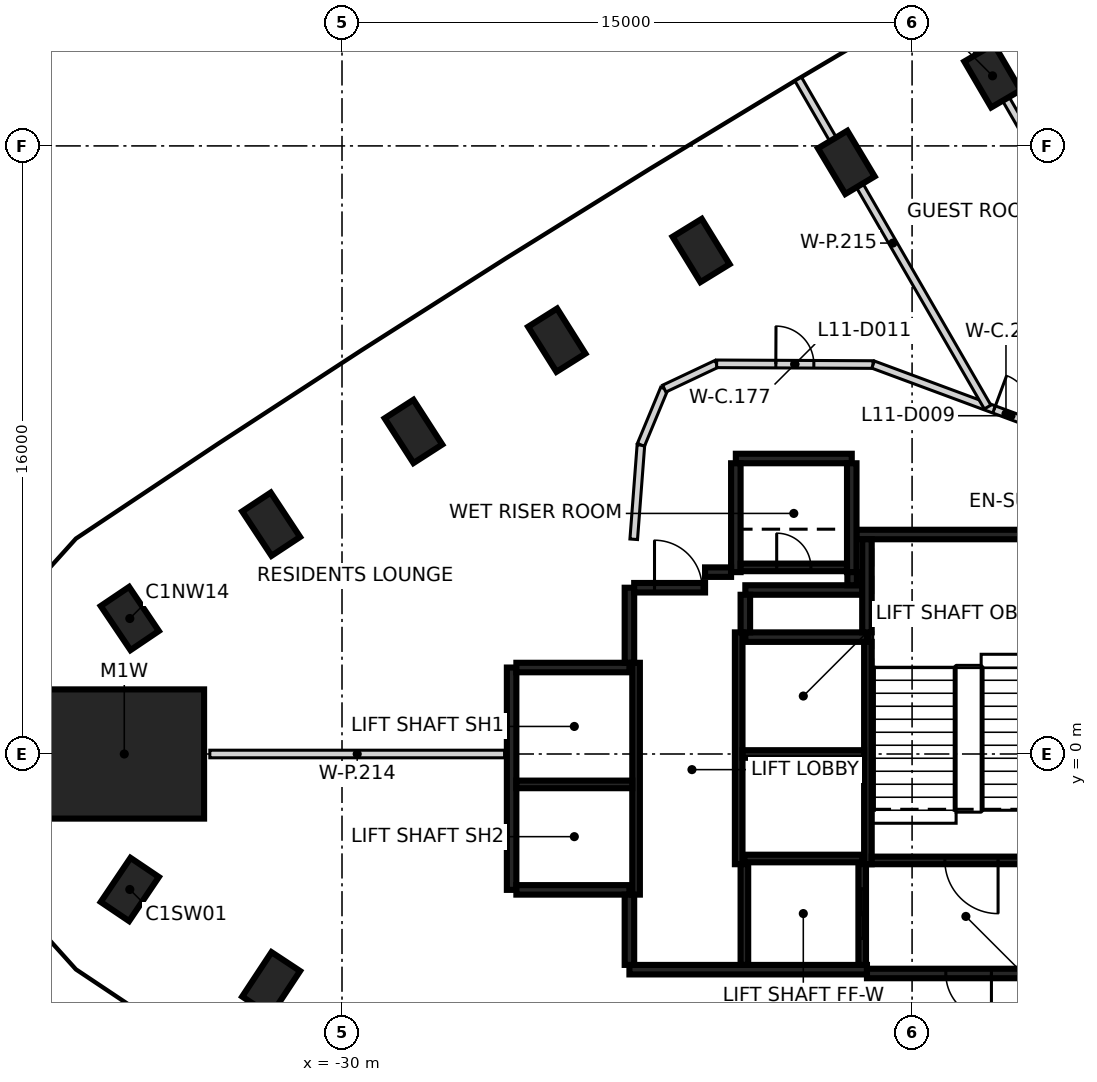
"""IFC4 building model, lengths in metres.
Left out: names, types, materials, properties, quantities, classifications, styles, units other than length and angle.
Written with IfcOpenShell. Run it as: python <this file> out.ifc"""

import sys

from ifc_helpers import new_model, si_unit, direction, frame, frame_2d, origin, origin_2d, place, context, subcontext, project, spatial, rectangle, extrude, element, fill, save


model = new_model("IFC4")
c1 = context("Model", 3, precision=1e-05, world=origin(), true_north=direction((0.0, 1.0)))
c2 = subcontext(c1, "Body", "Model", "MODEL_VIEW")
j1 = project(units=[si_unit("LENGTHUNIT", "METRE"), si_unit("PLANEANGLEUNIT", "RADIAN")], contexts=[c1])
p1 = place(None, origin())
s1 = spatial("IfcSite", under=j1, at=p1, CompositionType="ELEMENT")
p2 = place(p1, origin())
s2 = spatial("IfcBuilding", under=s1, at=p2, CompositionType="ELEMENT")
p3 = place(p2, frame((0.0, 0.0, 53.0)))
s3 = spatial("IfcBuildingStorey", under=s2, at=p3, CompositionType="ELEMENT", Elevation=53.0)
for number, where, z_axis, x_axis in (
    (1, (-12.883, 17.844, -0.475), (0.0, 0.0, 1.0), (-0.505, 0.863, 0.0)),
    (2, (-16.73, 15.566, -0.475), (0.0, 0.0, 1.0), (-0.514, 0.858, 0.0)),
    (3, (-20.552, 13.248, -0.475), (0.0, 0.0, 1.0), (-0.523, 0.852, 0.0)),
    (4, (-24.349, 10.888, -0.475), (0.0, 0.0, 1.0), (-0.532, 0.846, 0.0)),
    (5, (-28.12, 8.488, -0.475), (0.0, 0.0, 1.0), (-0.541, 0.841, 0.0)),
    (6, (-31.865, 6.046, -0.475), (0.0, 0.0, 1.0), (-0.551, 0.835, 0.0)),
    (7, (-35.583, 3.565, -0.475), (0.0, 0.0, 1.0), (-0.559, 0.829, 0.0)),
    (8, (-35.583, -3.565, -0.475), (0.0, 0.0, 1.0), (0.559, 0.829, 0.0)),
    (9, (-31.865, -6.046, -0.475), (0.0, 0.0, 1.0), (0.551, 0.835, 0.0)),
):
    element("IfcColumn", number, at=place(p3, frame(where, z_axis=z_axis, x_axis=x_axis)), inside=s3, PredefinedType="COLUMN", context=c2, shape_type="SweptSolid", body=[
        extrude(rectangle(XDim=1.4, YDim=0.9, at=origin_2d()), origin(), (0.0, 0.0, 1.0), 3.6),
    ])
p4 = place(p3, frame((-35.729, 0.0, -0.475), z_axis=(0.0, 0.0, 1.0), x_axis=(1.0, 0.0, 0.0)))
e10 = element("IfcColumn", 10, at=p4, inside=s3, PredefinedType="COLUMN", context=c2, shape_type="SweptSolid", body=[
    extrude(rectangle(XDim=4.2, YDim=3.4, at=origin_2d()), origin(), (0.0, 0.0, 1.0), 3.6),
])
p5 = place(p3, frame((-16.187, -5.675, 0.0), z_axis=(0.0, 0.0, 1.0), x_axis=(-1.0, 0.0, 0.0)))
e11 = element("IfcWall", 11, at=p5, inside=s3, PredefinedType="SHEAR", context=c2, shape_type="SweptSolid", body=[
    extrude(rectangle(XDim=6.25, YDim=0.25, at=frame_2d((3.125, 0.0))), origin(), (0.0, 0.0, 1.0), 3.125),
])
p6 = place(p3, frame((-25.537, -3.575, 0.0), z_axis=(0.0, 0.0, 1.0), x_axis=(0.0, 1.0, 0.0)))
e12 = element("IfcWall", 12, at=p6, inside=s3, PredefinedType="SHEAR", context=c2, shape_type="SweptSolid", body=[
    extrude(rectangle(XDim=5.85, YDim=0.25, at=frame_2d((2.925, 0.0))), origin(), (0.0, 0.0, 1.0), 3.125),
])
p7 = place(p3, frame((-10.963, -5.775, 0.0), z_axis=(0.0, 0.0, 1.0), x_axis=(-1.0, 0.0, 0.0)))
e13 = element("IfcWall", 13, at=p7, inside=s3, PredefinedType="SHEAR", context=c2, shape_type="SweptSolid", body=[
    extrude(rectangle(XDim=5.225, YDim=0.25, at=frame_2d((2.612, 0.0))), origin(), (0.0, 0.0, 1.0), 3.125),
])
p8 = place(p7, frame((1.95, 0.0, 0.0)))
e14 = element("IfcOpeningElement", 14, at=p8, cuts=e13, PredefinedType="OPENING", context=c2, shape_type="SweptSolid", body=[
    extrude(rectangle(XDim=1.2, YDim=2.1, at=frame_2d((0.6, 1.05))), frame((0.0, 0.135, 0.0), z_axis=(0.0, -1.0, 0.0), x_axis=(1.0, 0.0, 0.0)), (0.0, 0.0, 1.0), 0.27),
])
p9 = place(p3, frame((-16.472, 5.775, 0.0), z_axis=(0.0, 0.0, 1.0), x_axis=(1.0, 0.0, 0.0)))
e15 = element("IfcWall", 15, at=p9, inside=s3, PredefinedType="SHEAR", context=c2, shape_type="SweptSolid", body=[
    extrude(rectangle(XDim=5.51, YDim=0.25, at=frame_2d((2.755, 0.0))), origin(), (0.0, 0.0, 1.0), 3.125),
])
p10 = place(p3, frame((-19.387, 3.075, 0.0), z_axis=(0.0, 0.0, 1.0), x_axis=(1.0, 0.0, 0.0)))
e16 = element("IfcWall", 16, at=p10, inside=s3, PredefinedType="SHEAR", context=c2, shape_type="SweptSolid", body=[
    extrude(rectangle(XDim=3.2, YDim=0.25, at=frame_2d((1.6, 0.0))), origin(), (0.0, 0.0, 1.0), 3.125),
])
for number, where, z_axis, x_axis in (
    (17, (-22.437, -3.575, 0.0), (0.0, 0.0, 1.0), (-1.0, 0.0, 0.0)),
    (18, (-25.412, 2.275, 0.0), (0.0, 0.0, 1.0), (1.0, 0.0, 0.0)),
):
    element("IfcWall", number, at=place(p3, frame(where, z_axis=z_axis, x_axis=x_axis)), inside=s3, PredefinedType="SHEAR", context=c2, shape_type="SweptSolid", body=[
        extrude(rectangle(XDim=2.975, YDim=0.25, at=frame_2d((1.487, 0.0))), origin(), (0.0, 0.0, 1.0), 3.125),
    ])
p11 = place(p3, frame((-19.637, 7.775, 0.0), z_axis=(0.0, 0.0, 1.0), x_axis=(1.0, 0.0, 0.0)))
e19 = element("IfcWall", 19, at=p11, inside=s3, PredefinedType="SHEAR", context=c2, shape_type="SweptSolid", body=[
    extrude(rectangle(XDim=3.05, YDim=0.25, at=frame_2d((1.525, 0.0))), origin(), (0.0, 0.0, 1.0), 3.125),
])
for number, where, z_axis, x_axis in (
    (20, (-16.587, 7.65, 0.0), (0.0, 0.0, 1.0), (0.0, -1.0, 0.0)),
    (21, (-19.637, 4.785, 0.0), (0.0, 0.0, 1.0), (0.0, 1.0, 0.0)),
):
    element("IfcWall", number, at=place(p3, frame(where, z_axis=z_axis, x_axis=x_axis)), inside=s3, PredefinedType="SHEAR", context=c2, shape_type="SweptSolid", body=[
        extrude(rectangle(XDim=2.865, YDim=0.25, at=frame_2d((1.432, 0.0))), origin(), (0.0, 0.0, 1.0), 3.125),
    ])
p12 = place(p3, frame((-16.302, 4.315, 0.0), z_axis=(0.0, 0.0, 1.0), x_axis=(-1.0, 0.0, 0.0)))
e22 = element("IfcWall", 22, at=p12, inside=s3, PredefinedType="SHEAR", context=c2, shape_type="SweptSolid", body=[
    extrude(rectangle(XDim=3.085, YDim=0.25, at=frame_2d((1.542, 0.0))), origin(), (0.0, 0.0, 1.0), 3.125),
])
p13 = place(p3, frame((-16.187, 3.2, 0.0), z_axis=(0.0, 0.0, 1.0), x_axis=(0.0, 1.0, 0.0)))
e23 = element("IfcWall", 23, at=p13, inside=s3, PredefinedType="SHEAR", context=c2, shape_type="SweptSolid", body=[
    extrude(rectangle(XDim=2.449, YDim=0.25, at=frame_2d((1.225, 0.0))), origin(), (0.0, 0.0, 1.0), 3.125),
])
p14 = place(p3, frame((-22.437, 2.4, 0.0), z_axis=(0.0, 0.0, 1.0), x_axis=(0.0, 1.0, 0.0)))
e24 = element("IfcWall", 24, at=p14, inside=s3, PredefinedType="SHEAR", context=c2, shape_type="SweptSolid", body=[
    extrude(rectangle(XDim=1.975, YDim=0.25, at=frame_2d((0.987, 0.0))), origin(), (0.0, 0.0, 1.0), 3.125),
])
p15 = place(p3, frame((-22.437, -5.55, 0.0), z_axis=(0.0, 0.0, 1.0), x_axis=(0.0, 1.0, 0.0)))
e25 = element("IfcWall", 25, at=p15, inside=s3, PredefinedType="SHEAR", context=c2, shape_type="SweptSolid", body=[
    extrude(rectangle(XDim=1.849, YDim=0.25, at=frame_2d((0.925, 0.0))), origin(), (0.0, 0.0, 1.0), 3.125),
])
p16 = place(p3, frame((-22.312, 4.375, 0.0), z_axis=(0.0, 0.0, 1.0), x_axis=(1.0, 0.0, 0.0)))
e26 = element("IfcWall", 26, at=p16, inside=s3, PredefinedType="SHEAR", context=c2, shape_type="SweptSolid", body=[
    extrude(rectangle(XDim=1.865, YDim=0.25, at=frame_2d((0.932, 0.0))), origin(), (0.0, 0.0, 1.0), 3.125),
])
p17 = place(p16, frame((0.535, 0.0, 0.0)))
e27 = element("IfcOpeningElement", 27, at=p17, cuts=e26, PredefinedType="OPENING", context=c2, shape_type="SweptSolid", body=[
    extrude(rectangle(XDim=1.25, YDim=2.1, at=frame_2d((0.625, 1.05))), frame((0.0, 0.135, 0.0), z_axis=(0.0, -1.0, 0.0), x_axis=(1.0, 0.0, 0.0)), (0.0, 0.0, 1.0), 0.27),
])
p18 = place(p3, frame((-19.387, 4.19, 0.0), z_axis=(0.0, 0.0, 1.0), x_axis=(0.0, -1.0, 0.0)))
e28 = element("IfcWall", 28, at=p18, inside=s3, PredefinedType="SHEAR", context=c2, shape_type="SweptSolid", body=[
    extrude(rectangle(XDim=0.989, YDim=0.25, at=frame_2d((0.495, 0.0))), origin(), (0.0, 0.0, 1.0), 3.125),
])
p19 = place(p3, frame((-20.447, 4.785, 0.0), z_axis=(0.0, 0.0, 1.0), x_axis=(1.0, 0.0, 0.0)))
e29 = element("IfcWall", 29, at=p19, inside=s3, PredefinedType="SHEAR", context=c2, shape_type="SweptSolid", body=[
    extrude(rectangle(XDim=0.685, YDim=0.25, at=frame_2d((0.342, 0.0))), origin(), (0.0, 0.0, 1.0), 3.125),
])
p20 = place(p3, frame((-16.577, 4.785, 0.0), z_axis=(0.0, 0.0, 1.0), x_axis=(0.0, -1.0, 0.0)))
e30 = element("IfcWall", 30, at=p20, inside=s3, PredefinedType="SHEAR", context=c2, shape_type="SweptSolid", body=[
    extrude(rectangle(XDim=0.344, YDim=0.25, at=frame_2d((0.172, 0.0))), origin(), (0.0, 0.0, 1.0), 3.125),
])
p21 = place(p3, frame((-16.162, 2.951, 0.0), z_axis=(0.0, 0.0, 1.0), x_axis=(0.0, -1.0, 0.0)))
e31 = element("IfcWall", 31, at=p21, inside=s3, PredefinedType="SHEAR", context=c2, shape_type="SweptSolid", body=[
    extrude(rectangle(XDim=5.851, YDim=0.2, at=frame_2d((2.925, 0.0))), origin(), (0.0, 0.0, 1.0), 3.125),
])
for number, where, z_axis, x_axis in (
    (32, (-19.562, -2.9, 0.0), (0.0, 0.0, 1.0), (0.0, 1.0, 0.0)),
    (33, (-22.262, 2.4, 0.0), (0.0, 0.0, 1.0), (0.0, -1.0, 0.0)),
):
    element("IfcWall", number, at=place(p3, frame(where, z_axis=z_axis, x_axis=x_axis)), inside=s3, PredefinedType="SHEAR", context=c2, shape_type="SweptSolid", body=[
        extrude(rectangle(XDim=6.1, YDim=0.2, at=frame_2d((3.05, 0.0))), origin(), (0.0, 0.0, 1.0), 3.125),
    ])
p22 = place(p3, frame((-10.963, -2.8, 0.0), z_axis=(0.0, 0.0, 1.0), x_axis=(-1.0, 0.0, 0.0)))
e34 = element("IfcWall", 34, at=p22, inside=s3, PredefinedType="SHEAR", context=c2, shape_type="SweptSolid", body=[
    extrude(rectangle(XDim=5.098, YDim=0.2, at=frame_2d((2.549, 0.0))), origin(), (0.0, 0.0, 1.0), 3.125),
])
p23 = place(p22, frame((1.774, 0.0, 0.0)))
e35 = element("IfcOpeningElement", 35, at=p23, cuts=e34, PredefinedType="OPENING", context=c2, shape_type="SweptSolid", body=[
    extrude(rectangle(XDim=1.4, YDim=2.1, at=frame_2d((0.7, 1.05))), frame((0.0, 0.11, 0.0), z_axis=(0.0, -1.0, 0.0), x_axis=(1.0, 0.0, 0.0)), (0.0, 0.0, 1.0), 0.22),
])
p24 = place(p3, frame((-16.263, 0.0, 0.0), z_axis=(0.0, 0.0, 1.0), x_axis=(-1.0, 0.0, 0.0)))
e36 = element("IfcWall", 36, at=p24, inside=s3, PredefinedType="SHEAR", context=c2, shape_type="SweptSolid", body=[
    extrude(rectangle(XDim=3.198, YDim=0.2, at=frame_2d((1.599, 0.0))), origin(), (0.0, 0.0, 1.0), 3.125),
])
p25 = place(p3, frame((-22.363, -0.8, 0.0), z_axis=(0.0, 0.0, 1.0), x_axis=(-1.0, 0.0, 0.0)))
e37 = element("IfcWall", 37, at=p25, inside=s3, PredefinedType="SHEAR", context=c2, shape_type="SweptSolid", body=[
    extrude(rectangle(XDim=3.048, YDim=0.2, at=frame_2d((1.524, 0.0))), origin(), (0.0, 0.0, 1.0), 3.125),
])
p26 = place(p3, frame((-19.511, 4.91, 0.0), z_axis=(0.0, 0.0, 1.0), x_axis=(1.0, 0.0, 0.0)))
e38 = element("IfcWall", 38, at=p26, inside=s3, PredefinedType="SHEAR", context=c2, shape_type="SweptSolid", body=[
    extrude(rectangle(XDim=2.798, YDim=0.2, at=frame_2d((1.399, 0.0))), origin(), (0.0, 0.0, 1.0), 3.125),
])
p27 = place(p26, frame((0.949, 0.0, 0.0)))
e39 = element("IfcOpeningElement", 39, at=p27, cuts=e38, PredefinedType="OPENING", context=c2, shape_type="SweptSolid", body=[
    extrude(rectangle(XDim=0.9, YDim=2.1, at=frame_2d((0.45, 1.05))), frame((0.0, 0.11, 0.0), z_axis=(0.0, -1.0, 0.0), x_axis=(1.0, 0.0, 0.0)), (0.0, 0.0, 1.0), 0.22),
])
p28 = place(p3, frame((-19.412, -2.75, 0.0), z_axis=(0.0, 0.0, 1.0), x_axis=(1.0, 0.0, 0.0)))
e40 = element("IfcWall", 40, at=p28, inside=s3, PredefinedType="SHEAR", context=c2, shape_type="SweptSolid", body=[
    extrude(rectangle(XDim=3.1, YDim=0.2, at=frame_2d((1.55, 0.0))), origin(), (0.0, 0.0, 1.0), 3.125),
])
p29 = place(p3, frame((-16.312, -2.898, 0.0), z_axis=(0.0, 0.0, 1.0), x_axis=(0.0, -1.0, 0.0)))
e41 = element("IfcWall", 41, at=p29, inside=s3, PredefinedType="SHEAR", context=c2, shape_type="SweptSolid", body=[
    extrude(rectangle(XDim=2.651, YDim=0.2, at=frame_2d((1.325, 0.0))), origin(), (0.0, 0.0, 1.0), 3.125),
])
p30 = place(p29, frame((0.652, 0.0, 0.0)))
e42 = element("IfcOpeningElement", 42, at=p30, cuts=e41, PredefinedType="OPENING", context=c2, shape_type="SweptSolid", body=[
    extrude(rectangle(XDim=1.3, YDim=2.1, at=frame_2d((0.65, 1.05))), frame((0.0, 0.11, 0.0), z_axis=(0.0, -1.0, 0.0), x_axis=(1.0, 0.0, 0.0)), (0.0, 0.0, 1.0), 0.22),
])
p31 = place(p3, frame((-19.412, -5.549, 0.0), z_axis=(0.0, 0.0, 1.0), x_axis=(0.0, 1.0, 0.0)))
e43 = element("IfcWall", 43, at=p31, inside=s3, PredefinedType="SHEAR", context=c2, shape_type="SweptSolid", body=[
    extrude(rectangle(XDim=2.651, YDim=0.2, at=frame_2d((1.325, 0.0))), origin(), (0.0, 0.0, 1.0), 3.125),
])
p32 = place(p3, frame((-22.135, 8.13, 0.0), z_axis=(0.0, 0.0, 1.0), x_axis=(-0.076073461031, -0.997102215686, 0.0)))
e44 = element("IfcWall", 44, at=p32, inside=s3, PredefinedType="PARTITIONING", context=c2, shape_type="SweptSolid", body=[
    extrude(rectangle(XDim=2.487, YDim=0.2, at=frame_2d((1.244, 0.0))), origin(), (0.0, 0.0, 1.0), 3.125),
])
p33 = place(p3, frame((-22.135, 8.134, 0.0), z_axis=(0.0, 0.0, 1.0), x_axis=(0.383208453534, 0.923661886807, 0.0)))
e45 = element("IfcWall", 45, at=p33, inside=s3, PredefinedType="PARTITIONING", context=c2, shape_type="SweptSolid", body=[
    extrude(rectangle(XDim=1.602, YDim=0.2, at=frame_2d((0.801, 0.0))), origin(), (0.0, 0.0, 1.0), 3.125),
])
p34 = place(p3, frame((-21.521, 9.614, 0.0), z_axis=(0.0, 0.0, 1.0), x_axis=(0.904083527367, 0.427355795028, 0.0)))
e46 = element("IfcWall", 46, at=p34, inside=s3, PredefinedType="PARTITIONING", context=c2, shape_type="SweptSolid", body=[
    extrude(rectangle(XDim=1.523, YDim=0.2, at=frame_2d((0.761, 0.0))), origin(), (0.0, 0.0, 1.0), 3.125),
])
p35 = place(p3, frame((-20.143, 10.266, 0.0), z_axis=(0.0, 0.0, 1.0), x_axis=(0.999989297417, -0.004626559416, 0.0)))
e47 = element("IfcWall", 47, at=p35, inside=s3, PredefinedType="PARTITIONING", context=c2, shape_type="SweptSolid", body=[
    extrude(rectangle(XDim=4.116, YDim=0.2, at=frame_2d((2.058, 0.0))), origin(), (0.0, 0.0, 1.0), 3.125),
])
p36 = place(p35, frame((1.558, 0.0, 0.0)))
e48 = element("IfcOpeningElement", 48, at=p36, cuts=e47, PredefinedType="OPENING", context=c2, shape_type="SweptSolid", body=[
    extrude(rectangle(XDim=1.0, YDim=2.1, at=frame_2d((0.5, 1.05))), frame((0.0, 0.11, 0.0), z_axis=(0.0, -1.0, 0.0), x_axis=(1.0, 0.0, 0.0)), (0.0, 0.0, 1.0), 0.22),
])
p37 = place(p3, frame((-16.026, 10.246, 0.0), z_axis=(0.0, 0.0, 1.0), x_axis=(0.937598236139, -0.347720502112, 0.0)))
e49 = element("IfcWall", 49, at=p37, inside=s3, PredefinedType="PARTITIONING", context=c2, shape_type="SweptSolid", body=[
    extrude(rectangle(XDim=7.458, YDim=0.2, at=frame_2d((3.729, 0.0))), origin(), (0.0, 0.0, 1.0), 3.125),
])
p38 = place(p37, frame((3.396, 0.0, 0.0)))
e50 = element("IfcOpeningElement", 50, at=p38, cuts=e49, PredefinedType="OPENING", context=c2, shape_type="SweptSolid", body=[
    extrude(rectangle(XDim=0.95, YDim=2.1, at=frame_2d((0.475, 1.05))), frame((0.0, 0.11, 0.0), z_axis=(0.0, -1.0, 0.0), x_axis=(1.0, 0.0, 0.0)), (0.0, 0.0, 1.0), 0.22),
])
p39 = place(p3, frame((-33.478, 0.0, 0.0), z_axis=(0.0, 0.0, 1.0), x_axis=(1.0, 0.0, 0.0)))
e51 = element("IfcWall", 51, at=p39, inside=s3, PredefinedType="PARTITIONING", context=c2, shape_type="SweptSolid", body=[
    extrude(rectangle(XDim=7.756, YDim=0.2, at=frame_2d((3.878, 0.0))), origin(), (0.0, 0.0, 1.0), 3.125),
])
p40 = place(p3, frame((-17.996, 17.758, 0.0), z_axis=(0.0, 0.0, 1.0), x_axis=(0.500046945013, -0.865998298372, 0.0)))
e52 = element("IfcWall", 52, at=p40, inside=s3, PredefinedType="PARTITIONING", context=c2, shape_type="SweptSolid", body=[
    extrude(rectangle(XDim=9.964, YDim=0.2, at=frame_2d((4.982, 0.0))), origin(), (0.0, 0.0, 1.0), 3.125),
])
p41 = place(p3, frame((-14.149, 20.035, 0.0), z_axis=(0.0, 0.0, 1.0), x_axis=(0.500022967158, -0.866012143284, 0.0)))
e53 = element("IfcWall", 53, at=p41, inside=s3, PredefinedType="PARTITIONING", context=c2, shape_type="SweptSolid", body=[
    extrude(rectangle(XDim=11.838, YDim=0.2, at=frame_2d((5.919, 0.0))), origin(), (0.0, 0.0, 1.0), 3.125),
])
p42 = place(p3, frame((-14.148, -20.035, 0.0), z_axis=(0.0, 0.0, 1.0), x_axis=(0.499978771293, 0.866037659837, 0.0)))
e54 = element("IfcWall", 54, at=p42, inside=s3, PredefinedType="PARTITIONING", context=c2, shape_type="SweptSolid", body=[
    extrude(rectangle(XDim=17.425, YDim=0.2, at=frame_2d((8.712, 0.0))), origin(), (0.0, 0.0, 1.0), 3.125),
])
p43 = place(p30, origin())
e55 = element("IfcDoor", 55, at=p43, inside=s3, OperationType="SLIDING_TO_LEFT", PredefinedType="DOOR", context=c2, shape_type="SweptSolid", body=[
    extrude(rectangle(XDim=1.3, YDim=2.1, at=frame_2d((0.65, 1.05))), frame((0.0, 0.025, 0.0), z_axis=(0.0, -1.0, 0.0), x_axis=(1.0, 0.0, 0.0)), (0.0, 0.0, 1.0), 0.05),
])
fill(e42, e55)
p44 = place(p17, origin())
e56 = element("IfcDoor", 56, at=p44, inside=s3, OperationType="SINGLE_SWING_LEFT", PredefinedType="DOOR", context=c2, shape_type="SweptSolid", body=[
    extrude(rectangle(XDim=1.25, YDim=2.1, at=frame_2d((0.625, 1.05))), frame((0.0, 0.025, 0.0), z_axis=(0.0, -1.0, 0.0), x_axis=(1.0, 0.0, 0.0)), (0.0, 0.0, 1.0), 0.05),
])
fill(e27, e56)
p45 = place(p23, origin())
e57 = element("IfcDoor", 57, at=p45, inside=s3, OperationType="SINGLE_SWING_LEFT", PredefinedType="DOOR", context=c2, shape_type="SweptSolid", body=[
    extrude(rectangle(XDim=1.4, YDim=2.1, at=frame_2d((0.7, 1.05))), frame((0.0, 0.025, 0.0), z_axis=(0.0, -1.0, 0.0), x_axis=(1.0, 0.0, 0.0)), (0.0, 0.0, 1.0), 0.05),
])
fill(e35, e57)
p46 = place(p27, origin())
e58 = element("IfcDoor", 58, at=p46, inside=s3, OperationType="SINGLE_SWING_RIGHT", PredefinedType="DOOR", context=c2, shape_type="SweptSolid", body=[
    extrude(rectangle(XDim=0.9, YDim=2.1, at=frame_2d((0.45, 1.05))), frame((0.0, 0.025, 0.0), z_axis=(0.0, -1.0, 0.0), x_axis=(1.0, 0.0, 0.0)), (0.0, 0.0, 1.0), 0.05),
])
fill(e39, e58)
p47 = place(p8, origin())
e59 = element("IfcDoor", 59, at=p47, inside=s3, OperationType="SINGLE_SWING_RIGHT", PredefinedType="DOOR", context=c2, shape_type="SweptSolid", body=[
    extrude(rectangle(XDim=1.2, YDim=2.1, at=frame_2d((0.6, 1.05))), frame((0.0, 0.025, 0.0), z_axis=(0.0, -1.0, 0.0), x_axis=(1.0, 0.0, 0.0)), (0.0, 0.0, 1.0), 0.05),
])
fill(e14, e59)
p48 = place(p38, origin())
e60 = element("IfcDoor", 60, at=p48, inside=s3, OperationType="SINGLE_SWING_LEFT", PredefinedType="DOOR", context=c2, shape_type="SweptSolid", body=[
    extrude(rectangle(XDim=0.95, YDim=2.1, at=frame_2d((0.475, 1.05))), frame((0.0, 0.025, 0.0), z_axis=(0.0, -1.0, 0.0), x_axis=(1.0, 0.0, 0.0)), (0.0, 0.0, 1.0), 0.05),
])
fill(e50, e60)
p49 = place(p36, frame((1.0, 0.0, 0.0), z_axis=(0.0, 0.0, 1.0), x_axis=(-1.0, 0.0, 0.0)))
e61 = element("IfcDoor", 61, at=p49, inside=s3, OperationType="SINGLE_SWING_LEFT", PredefinedType="DOOR", context=c2, shape_type="SweptSolid", body=[
    extrude(rectangle(XDim=1.0, YDim=2.1, at=frame_2d((0.5, 1.05))), frame((0.0, 0.025, 0.0), z_axis=(0.0, -1.0, 0.0), x_axis=(1.0, 0.0, 0.0)), (0.0, 0.0, 1.0), 0.05),
])
fill(e48, e61)
save(model, sys.argv[1])
